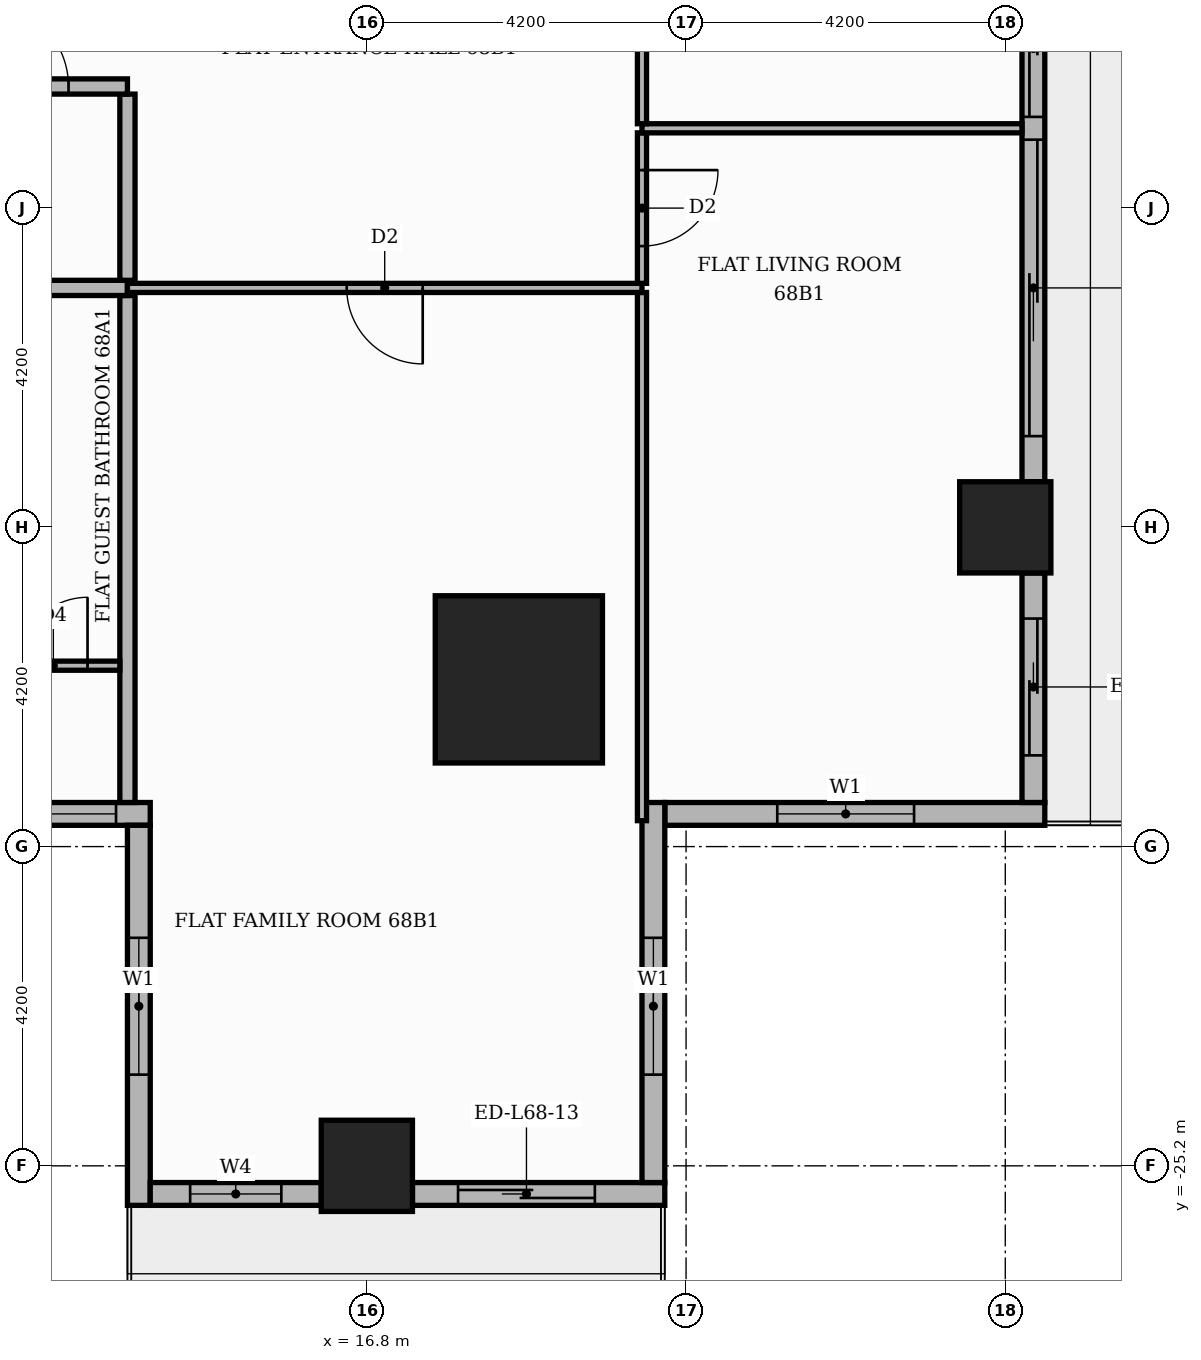
"""IFC4 building model, lengths in metres.
Left out: names, types, materials, properties, quantities, classifications, styles, units other than length and angle.
Written with IfcOpenShell. Run it as: python <this file> out.ifc"""

import sys

from ifc_helpers import new_model, si_unit, direction, frame, frame_2d, origin, origin_2d, place, context, subcontext, project, spatial, rectangle, extrude, element, fill, save


model = new_model("IFC4")
c1 = context("Model", 3, precision=1e-05, world=origin(), true_north=direction((0.0, 1.0)))
c2 = subcontext(c1, "Body", "Model", "MODEL_VIEW")
j1 = project(units=[si_unit("LENGTHUNIT", "METRE"), si_unit("PLANEANGLEUNIT", "RADIAN")], contexts=[c1])
p1 = place(None, origin())
s1 = spatial("IfcSite", under=j1, at=p1, CompositionType="ELEMENT")
p2 = place(p1, origin())
s2 = spatial("IfcBuilding", under=s1, at=p2, CompositionType="ELEMENT")
p3 = place(p2, frame((0.0, 0.0, 283.5)))
s3 = spatial("IfcBuildingStorey", under=s2, at=p3, CompositionType="ELEMENT", Elevation=283.5)
p4 = place(p3, frame((18.8, -18.8, 0.0), z_axis=(0.0, 0.0, 1.0), x_axis=(1.0, 0.0, 0.0)))
e1 = element("IfcColumn", 1, at=p4, inside=s3, PredefinedType="COLUMN", context=c2, shape_type="SweptSolid", body=[
    extrude(rectangle(XDim=2.2, YDim=2.2, at=origin_2d()), origin(), (0.0, 0.0, 1.0), 3.9),
])
for number, where, z_axis, x_axis in (
    (2, (25.2, -16.8, 0.0), (0.0, 0.0, 1.0), (1.0, 0.0, 0.0)),
    (3, (16.8, -25.2, 0.0), (0.0, 0.0, 1.0), (1.0, 0.0, 0.0)),
):
    element("IfcColumn", number, at=place(p3, frame(where, z_axis=z_axis, x_axis=x_axis)), inside=s3, PredefinedType="COLUMN", context=c2, shape_type="SweptSolid", body=[
        extrude(rectangle(XDim=1.2, YDim=1.2, at=origin_2d()), origin(), (0.0, 0.0, 1.0), 3.9),
    ])
p5 = place(p3, frame((20.72, -20.57, 0.0), z_axis=(0.0, 0.0, 1.0), x_axis=(1.0, 0.0, 0.0)))
e4 = element("IfcWall", 4, at=p5, inside=s3, PredefinedType="STANDARD", context=c2, shape_type="SweptSolid", body=[
    extrude(rectangle(XDim=5.0, YDim=0.3, at=frame_2d((2.5, 0.0))), origin(), (0.0, 0.0, 1.0), 3.4),
])
p6 = place(p5, frame((1.48, 0.0, 0.9)))
e5 = element("IfcOpeningElement", 5, at=p6, cuts=e4, PredefinedType="OPENING", context=c2, shape_type="SweptSolid", body=[
    extrude(rectangle(XDim=1.8, YDim=2.1, at=frame_2d((0.9, 1.05))), frame((0.0, 0.16, 0.0), z_axis=(0.0, -1.0, 0.0), x_axis=(1.0, 0.0, 0.0)), (0.0, 0.0, 1.0), 0.32),
])
p7 = place(p3, frame((25.57, -20.42, 0.0), z_axis=(0.0, 0.0, 1.0), x_axis=(0.0, 1.0, 0.0)))
e6 = element("IfcWall", 6, at=p7, inside=s3, PredefinedType="STANDARD", context=c2, shape_type="SweptSolid", body=[
    extrude(rectangle(XDim=3.02, YDim=0.3, at=frame_2d((1.51, 0.0))), origin(), (0.0, 0.0, 1.0), 3.4),
])
p8 = place(p7, frame((0.62, 0.0, 0.0)))
e7 = element("IfcOpeningElement", 7, at=p8, cuts=e6, PredefinedType="OPENING", context=c2, shape_type="SweptSolid", body=[
    extrude(rectangle(XDim=1.8, YDim=2.4, at=frame_2d((0.9, 1.2))), frame((0.0, 0.16, 0.0), z_axis=(0.0, -1.0, 0.0), x_axis=(1.0, 0.0, 0.0)), (0.0, 0.0, 1.0), 0.32),
])
p9 = place(p3, frame((25.57, -16.2, 0.0), z_axis=(0.0, 0.0, 1.0), x_axis=(0.0, 1.0, 0.0)))
e8 = element("IfcWall", 8, at=p9, inside=s3, PredefinedType="STANDARD", context=c2, shape_type="SweptSolid", body=[
    extrude(rectangle(XDim=7.2, YDim=0.3, at=frame_2d((3.6, 0.0))), origin(), (0.0, 0.0, 1.0), 3.4),
])
p10 = place(p9, frame((0.6, 0.0, 0.0)))
e9 = element("IfcOpeningElement", 9, at=p10, cuts=e8, PredefinedType="OPENING", context=c2, shape_type="SweptSolid", body=[
    extrude(rectangle(XDim=3.9, YDim=2.4, at=frame_2d((1.95, 1.2))), frame((0.0, 0.16, 0.0), z_axis=(0.0, -1.0, 0.0), x_axis=(1.0, 0.0, 0.0)), (0.0, 0.0, 1.0), 0.32),
])
p11 = place(p9, frame((4.8, 0.0, 0.0)))
e10 = element("IfcOpeningElement", 10, at=p11, cuts=e8, PredefinedType="OPENING", context=c2, shape_type="SweptSolid", body=[
    extrude(rectangle(XDim=1.8, YDim=2.4, at=frame_2d((0.9, 1.2))), frame((0.0, 0.16, 0.0), z_axis=(0.0, -1.0, 0.0), x_axis=(1.0, 0.0, 0.0)), (0.0, 0.0, 1.0), 0.32),
])
p12 = place(p3, frame((-13.65, -20.57, 0.0), z_axis=(0.0, 0.0, 1.0), x_axis=(1.0, 0.0, 0.0)))
e11 = element("IfcWall", 11, at=p12, inside=s3, PredefinedType="STANDARD", context=c2, shape_type="SweptSolid", body=[
    extrude(rectangle(XDim=27.6, YDim=0.3, at=frame_2d((13.8, 0.0))), origin(), (0.0, 0.0, 1.0), 3.4),
])
p13 = place(p12, frame((0.15, 0.0, 0.9)))
e12 = element("IfcOpeningElement", 12, at=p13, cuts=e11, PredefinedType="OPENING", context=c2, shape_type="SweptSolid", body=[
    extrude(rectangle(XDim=1.8, YDim=2.1, at=frame_2d((0.9, 1.05))), frame((0.0, 0.16, 0.0), z_axis=(0.0, -1.0, 0.0), x_axis=(1.0, 0.0, 0.0)), (0.0, 0.0, 1.0), 0.32),
])
p14 = place(p12, frame((2.25, 0.0, 0.9)))
e13 = element("IfcOpeningElement", 13, at=p14, cuts=e11, PredefinedType="OPENING", context=c2, shape_type="SweptSolid", body=[
    extrude(rectangle(XDim=6.0, YDim=2.1, at=frame_2d((3.0, 1.05))), frame((0.0, 0.16, 0.0), z_axis=(0.0, -1.0, 0.0), x_axis=(1.0, 0.0, 0.0)), (0.0, 0.0, 1.0), 0.32),
])
p15 = place(p12, frame((8.55, 0.0, 0.9)))
e14 = element("IfcOpeningElement", 14, at=p15, cuts=e11, PredefinedType="OPENING", context=c2, shape_type="SweptSolid", body=[
    extrude(rectangle(XDim=6.0, YDim=2.1, at=frame_2d((3.0, 1.05))), frame((0.0, 0.16, 0.0), z_axis=(0.0, -1.0, 0.0), x_axis=(1.0, 0.0, 0.0)), (0.0, 0.0, 1.0), 0.32),
])
p16 = place(p12, frame((14.85, 0.0, 0.9)))
e15 = element("IfcOpeningElement", 15, at=p16, cuts=e11, PredefinedType="OPENING", context=c2, shape_type="SweptSolid", body=[
    extrude(rectangle(XDim=6.0, YDim=2.1, at=frame_2d((3.0, 1.05))), frame((0.0, 0.16, 0.0), z_axis=(0.0, -1.0, 0.0), x_axis=(1.0, 0.0, 0.0)), (0.0, 0.0, 1.0), 0.32),
])
p17 = place(p12, frame((21.15, 0.0, 0.9)))
e16 = element("IfcOpeningElement", 16, at=p17, cuts=e11, PredefinedType="OPENING", context=c2, shape_type="SweptSolid", body=[
    extrude(rectangle(XDim=6.0, YDim=2.1, at=frame_2d((3.0, 1.05))), frame((0.0, 0.16, 0.0), z_axis=(0.0, -1.0, 0.0), x_axis=(1.0, 0.0, 0.0)), (0.0, 0.0, 1.0), 0.32),
])
p18 = place(p3, frame((13.8, -20.72, 0.0), z_axis=(0.0, 0.0, 1.0), x_axis=(0.0, -1.0, 0.0)))
e17 = element("IfcWall", 17, at=p18, inside=s3, PredefinedType="STANDARD", context=c2, shape_type="SweptSolid", body=[
    extrude(rectangle(XDim=5.0, YDim=0.3, at=frame_2d((2.5, 0.0))), origin(), (0.0, 0.0, 1.0), 3.4),
])
p19 = place(p18, frame((1.48, 0.0, 0.9)))
e18 = element("IfcOpeningElement", 18, at=p19, cuts=e17, PredefinedType="OPENING", context=c2, shape_type="SweptSolid", body=[
    extrude(rectangle(XDim=1.8, YDim=2.1, at=frame_2d((0.9, 1.05))), frame((0.0, 0.16, 0.0), z_axis=(0.0, -1.0, 0.0), x_axis=(1.0, 0.0, 0.0)), (0.0, 0.0, 1.0), 0.32),
])
p20 = place(p3, frame((13.95, -25.57, 0.0), z_axis=(0.0, 0.0, 1.0), x_axis=(1.0, 0.0, 0.0)))
e19 = element("IfcWall", 19, at=p20, inside=s3, PredefinedType="STANDARD", context=c2, shape_type="SweptSolid", body=[
    extrude(rectangle(XDim=2.25, YDim=0.3, at=frame_2d((1.125, 0.0))), origin(), (0.0, 0.0, 1.0), 3.4),
])
p21 = place(p20, frame((0.525, 0.0, 0.9)))
e20 = element("IfcOpeningElement", 20, at=p21, cuts=e19, PredefinedType="OPENING", context=c2, shape_type="SweptSolid", body=[
    extrude(rectangle(XDim=1.2, YDim=2.1, at=frame_2d((0.6, 1.05))), frame((0.0, 0.16, 0.0), z_axis=(0.0, -1.0, 0.0), x_axis=(1.0, 0.0, 0.0)), (0.0, 0.0, 1.0), 0.32),
])
p22 = place(p3, frame((17.4, -25.57, 0.0), z_axis=(0.0, 0.0, 1.0), x_axis=(1.0, 0.0, 0.0)))
e21 = element("IfcWall", 21, at=p22, inside=s3, PredefinedType="STANDARD", context=c2, shape_type="SweptSolid", body=[
    extrude(rectangle(XDim=3.32, YDim=0.3, at=frame_2d((1.66, 0.0))), origin(), (0.0, 0.0, 1.0), 3.4),
])
p23 = place(p22, frame((0.6, 0.0, 0.0)))
e22 = element("IfcOpeningElement", 22, at=p23, cuts=e21, PredefinedType="OPENING", context=c2, shape_type="SweptSolid", body=[
    extrude(rectangle(XDim=1.8, YDim=2.4, at=frame_2d((0.9, 1.2))), frame((0.0, 0.16, 0.0), z_axis=(0.0, -1.0, 0.0), x_axis=(1.0, 0.0, 0.0)), (0.0, 0.0, 1.0), 0.32),
])
p24 = place(p3, frame((20.57, -25.42, 0.0), z_axis=(0.0, 0.0, 1.0), x_axis=(0.0, 1.0, 0.0)))
e23 = element("IfcWall", 23, at=p24, inside=s3, PredefinedType="STANDARD", context=c2, shape_type="SweptSolid", body=[
    extrude(rectangle(XDim=5.0, YDim=0.3, at=frame_2d((2.5, 0.0))), origin(), (0.0, 0.0, 1.0), 3.4),
])
p25 = place(p24, frame((1.42, 0.0, 0.9)))
e24 = element("IfcOpeningElement", 24, at=p25, cuts=e23, PredefinedType="OPENING", context=c2, shape_type="SweptSolid", body=[
    extrude(rectangle(XDim=1.8, YDim=2.1, at=frame_2d((0.9, 1.05))), frame((0.0, 0.16, 0.0), z_axis=(0.0, -1.0, 0.0), x_axis=(1.0, 0.0, 0.0)), (0.0, 0.0, 1.0), 0.32),
])
p26 = place(p3, frame((13.65, -20.42, 0.0), z_axis=(0.0, 0.0, 1.0), x_axis=(0.0, 1.0, 0.0)))
e25 = element("IfcWall", 25, at=p26, inside=s3, PredefinedType="PARTITIONING", context=c2, shape_type="SweptSolid", body=[
    extrude(rectangle(XDim=6.67, YDim=0.2, at=frame_2d((3.335, 0.0))), origin(), (0.0, 0.0, 1.0), 3.4),
])
p27 = place(p3, frame((20.42, -20.659, 0.0), z_axis=(0.0, 0.0, 1.0), x_axis=(0.0, 1.0, 0.0)))
e26 = element("IfcWall", 26, at=p27, inside=s3, PredefinedType="PARTITIONING", context=c2, shape_type="SweptSolid", body=[
    extrude(rectangle(XDim=6.949, YDim=0.12, at=frame_2d((3.475, 0.0))), origin(), (0.0, 0.0, 1.0), 3.4),
])
p28 = place(p3, frame((-7.35, -18.62, 0.0), z_axis=(0.0, 0.0, 1.0), x_axis=(1.0, 0.0, 0.0)))
e27 = element("IfcWall", 27, at=p28, inside=s3, PredefinedType="PARTITIONING", context=c2, shape_type="SweptSolid", body=[
    extrude(rectangle(XDim=20.9, YDim=0.12, at=frame_2d((10.45, 0.0))), origin(), (0.0, 0.0, 1.0), 3.4),
])
p29 = place(p28, frame((2.7, 0.0, 0.0)))
e28 = element("IfcOpeningElement", 28, at=p29, cuts=e27, PredefinedType="OPENING", context=c2, shape_type="SweptSolid", body=[
    extrude(rectangle(XDim=0.9, YDim=2.1, at=frame_2d((0.45, 1.05))), frame((0.0, 0.07, 0.0), z_axis=(0.0, -1.0, 0.0), x_axis=(1.0, 0.0, 0.0)), (0.0, 0.0, 1.0), 0.14),
])
p30 = place(p28, frame((7.95, 0.0, 0.0)))
e29 = element("IfcOpeningElement", 29, at=p30, cuts=e27, PredefinedType="OPENING", context=c2, shape_type="SweptSolid", body=[
    extrude(rectangle(XDim=0.9, YDim=2.1, at=frame_2d((0.45, 1.05))), frame((0.0, 0.07, 0.0), z_axis=(0.0, -1.0, 0.0), x_axis=(1.0, 0.0, 0.0)), (0.0, 0.0, 1.0), 0.14),
])
p31 = place(p28, frame((13.35, 0.0, 0.0)))
e30 = element("IfcOpeningElement", 30, at=p31, cuts=e27, PredefinedType="OPENING", context=c2, shape_type="SweptSolid", body=[
    extrude(rectangle(XDim=0.9, YDim=2.1, at=frame_2d((0.45, 1.05))), frame((0.0, 0.07, 0.0), z_axis=(0.0, -1.0, 0.0), x_axis=(1.0, 0.0, 0.0)), (0.0, 0.0, 1.0), 0.14),
])
p32 = place(p28, frame((17.625, 0.0, 0.0)))
e31 = element("IfcOpeningElement", 31, at=p32, cuts=e27, PredefinedType="OPENING", context=c2, shape_type="SweptSolid", body=[
    extrude(rectangle(XDim=0.9, YDim=2.1, at=frame_2d((0.45, 1.05))), frame((0.0, 0.07, 0.0), z_axis=(0.0, -1.0, 0.0), x_axis=(1.0, 0.0, 0.0)), (0.0, 0.0, 1.0), 0.14),
])
p33 = place(p28, frame((19.575, 0.0, 0.0)))
e32 = element("IfcOpeningElement", 32, at=p33, cuts=e27, PredefinedType="OPENING", context=c2, shape_type="SweptSolid", body=[
    extrude(rectangle(XDim=0.9, YDim=2.1, at=frame_2d((0.45, 1.05))), frame((0.0, 0.07, 0.0), z_axis=(0.0, -1.0, 0.0), x_axis=(1.0, 0.0, 0.0)), (0.0, 0.0, 1.0), 0.14),
])
p34 = place(p3, frame((-25.42, -13.65, 0.0), z_axis=(0.0, 0.0, 1.0), x_axis=(1.0, 0.0, 0.0)))
e33 = element("IfcWall", 33, at=p34, inside=s3, PredefinedType="PARTITIONING", context=c2, shape_type="SweptSolid", body=[
    extrude(rectangle(XDim=39.07, YDim=0.2, at=frame_2d((19.535, 0.0))), origin(), (0.0, 0.0, 1.0), 3.4),
])
p35 = place(p34, frame((14.37, 0.0, 0.0)))
e34 = element("IfcOpeningElement", 34, at=p35, cuts=e33, PredefinedType="OPENING", context=c2, shape_type="SweptSolid", body=[
    extrude(rectangle(XDim=1.1, YDim=2.4, at=frame_2d((0.55, 1.2))), frame((0.0, 0.11, 0.0), z_axis=(0.0, -1.0, 0.0), x_axis=(1.0, 0.0, 0.0)), (0.0, 0.0, 1.0), 0.22),
])
p36 = place(p3, frame((13.65, -13.65, 0.0), z_axis=(0.0, 0.0, 1.0), x_axis=(1.0, 0.0, 0.0)))
e35 = element("IfcWall", 35, at=p36, inside=s3, PredefinedType="PARTITIONING", context=c2, shape_type="SweptSolid", body=[
    extrude(rectangle(XDim=6.77, YDim=0.12, at=frame_2d((3.385, 0.0))), origin(), (0.0, 0.0, 1.0), 3.4),
])
p37 = place(p36, frame((2.885, 0.0, 0.0)))
e36 = element("IfcOpeningElement", 36, at=p37, cuts=e35, PredefinedType="OPENING", context=c2, shape_type="SweptSolid", body=[
    extrude(rectangle(XDim=1.0, YDim=2.1, at=frame_2d((0.5, 1.05))), frame((0.0, 0.07, 0.0), z_axis=(0.0, -1.0, 0.0), x_axis=(1.0, 0.0, 0.0)), (0.0, 0.0, 1.0), 0.14),
])
p38 = place(p3, frame((20.42, -13.59, 0.0), z_axis=(0.0, 0.0, 1.0), x_axis=(0.0, 1.0, 0.0)))
e37 = element("IfcWall", 37, at=p38, inside=s3, PredefinedType="PARTITIONING", context=c2, shape_type="SweptSolid", body=[
    extrude(rectangle(XDim=1.98, YDim=0.12, at=frame_2d((0.99, 0.0))), origin(), (0.0, 0.0, 1.0), 3.4),
])
p39 = place(p38, frame((0.49, 0.0, 0.0)))
e38 = element("IfcOpeningElement", 38, at=p39, cuts=e37, PredefinedType="OPENING", context=c2, shape_type="SweptSolid", body=[
    extrude(rectangle(XDim=1.0, YDim=2.1, at=frame_2d((0.5, 1.05))), frame((0.0, 0.07, 0.0), z_axis=(0.0, -1.0, 0.0), x_axis=(1.0, 0.0, 0.0)), (0.0, 0.0, 1.0), 0.14),
])
p40 = place(p3, frame((13.65, -13.55, 0.0), z_axis=(0.0, 0.0, 1.0), x_axis=(0.0, 1.0, 0.0)))
e39 = element("IfcWall", 39, at=p40, inside=s3, PredefinedType="PARTITIONING", context=c2, shape_type="SweptSolid", body=[
    extrude(rectangle(XDim=2.45, YDim=0.2, at=frame_2d((1.225, 0.0))), origin(), (0.0, 0.0, 1.0), 3.4),
])
p41 = place(p3, frame((20.42, -11.55, 0.0), z_axis=(0.0, 0.0, 1.0), x_axis=(1.0, 0.0, 0.0)))
e40 = element("IfcWall", 40, at=p41, inside=s3, PredefinedType="PARTITIONING", context=c2, shape_type="SweptSolid", body=[
    extrude(rectangle(XDim=5.0, YDim=0.12, at=frame_2d((2.5, 0.0))), origin(), (0.0, 0.0, 1.0), 3.4),
])
p42 = place(p3, frame((20.42, -11.49, 0.0), z_axis=(0.0, 0.0, 1.0), x_axis=(0.0, 1.0, 0.0)))
e41 = element("IfcWall", 41, at=p42, inside=s3, PredefinedType="PARTITIONING", context=c2, shape_type="SweptSolid", body=[
    extrude(rectangle(XDim=8.28, YDim=0.12, at=frame_2d((4.14, 0.0))), origin(), (0.0, 0.0, 1.0), 3.4),
])
p43 = place(p42, frame((3.69, 0.0, 0.0)))
e42 = element("IfcOpeningElement", 42, at=p43, cuts=e41, PredefinedType="OPENING", context=c2, shape_type="SweptSolid", body=[
    extrude(rectangle(XDim=0.9, YDim=2.1, at=frame_2d((0.45, 1.05))), frame((0.0, 0.07, 0.0), z_axis=(0.0, -1.0, 0.0), x_axis=(1.0, 0.0, 0.0)), (0.0, 0.0, 1.0), 0.14),
])
p44 = place(p3, frame((11.0, -11.0, 0.0), z_axis=(0.0, 0.0, 1.0), x_axis=(1.0, 0.0, 0.0)))
e43 = element("IfcWall", 43, at=p44, inside=s3, PredefinedType="PARTITIONING", context=c2, shape_type="SweptSolid", body=[
    extrude(rectangle(XDim=2.65, YDim=0.2, at=frame_2d((1.325, 0.0))), origin(), (0.0, 0.0, 1.0), 3.4),
])
p45 = place(p44, frame((0.775, 0.0, 0.0)))
e44 = element("IfcOpeningElement", 44, at=p45, cuts=e43, PredefinedType="OPENING", context=c2, shape_type="SweptSolid", body=[
    extrude(rectangle(XDim=1.1, YDim=2.4, at=frame_2d((0.55, 1.2))), frame((0.0, 0.11, 0.0), z_axis=(0.0, -1.0, 0.0), x_axis=(1.0, 0.0, 0.0)), (0.0, 0.0, 1.0), 0.22),
])
p46 = place(p6, origin())
e45 = element("IfcWindow", 45, at=p46, inside=s3, PartitioningType="SINGLE_PANEL", PredefinedType="WINDOW", context=c2, shape_type="SweptSolid", body=[
    extrude(rectangle(XDim=1.8, YDim=2.1, at=frame_2d((0.9, 1.05))), frame((0.0, 0.03, 0.0), z_axis=(0.0, -1.0, 0.0), x_axis=(1.0, 0.0, 0.0)), (0.0, 0.0, 1.0), 0.06),
])
fill(e5, e45)
p47 = place(p8, origin())
e46 = element("IfcDoor", 46, at=p47, inside=s3, OperationType="SLIDING_TO_RIGHT", PredefinedType="DOOR", context=c2, shape_type="SweptSolid", body=[
    extrude(rectangle(XDim=1.8, YDim=2.4, at=frame_2d((0.9, 1.2))), frame((0.0, 0.025, 0.0), z_axis=(0.0, -1.0, 0.0), x_axis=(1.0, 0.0, 0.0)), (0.0, 0.0, 1.0), 0.05),
])
fill(e7, e46)
p48 = place(p10, origin())
e47 = element("IfcDoor", 47, at=p48, inside=s3, OperationType="SLIDING_TO_LEFT", PredefinedType="DOOR", context=c2, shape_type="SweptSolid", body=[
    extrude(rectangle(XDim=3.9, YDim=2.4, at=frame_2d((1.95, 1.2))), frame((0.0, 0.025, 0.0), z_axis=(0.0, -1.0, 0.0), x_axis=(1.0, 0.0, 0.0)), (0.0, 0.0, 1.0), 0.05),
])
fill(e9, e47)
p49 = place(p11, origin())
e48 = element("IfcDoor", 48, at=p49, inside=s3, OperationType="SLIDING_TO_RIGHT", PredefinedType="DOOR", context=c2, shape_type="SweptSolid", body=[
    extrude(rectangle(XDim=1.8, YDim=2.4, at=frame_2d((0.9, 1.2))), frame((0.0, 0.025, 0.0), z_axis=(0.0, -1.0, 0.0), x_axis=(1.0, 0.0, 0.0)), (0.0, 0.0, 1.0), 0.05),
])
fill(e10, e48)
p50 = place(p17, origin())
e49 = element("IfcWindow", 49, at=p50, inside=s3, PartitioningType="SINGLE_PANEL", PredefinedType="WINDOW", context=c2, shape_type="SweptSolid", body=[
    extrude(rectangle(XDim=6.0, YDim=2.1, at=frame_2d((3.0, 1.05))), frame((0.0, 0.03, 0.0), z_axis=(0.0, -1.0, 0.0), x_axis=(1.0, 0.0, 0.0)), (0.0, 0.0, 1.0), 0.06),
])
fill(e16, e49)
p51 = place(p19, origin())
e50 = element("IfcWindow", 50, at=p51, inside=s3, PartitioningType="SINGLE_PANEL", PredefinedType="WINDOW", context=c2, shape_type="SweptSolid", body=[
    extrude(rectangle(XDim=1.8, YDim=2.1, at=frame_2d((0.9, 1.05))), frame((0.0, 0.03, 0.0), z_axis=(0.0, -1.0, 0.0), x_axis=(1.0, 0.0, 0.0)), (0.0, 0.0, 1.0), 0.06),
])
fill(e18, e50)
p52 = place(p21, origin())
e51 = element("IfcWindow", 51, at=p52, inside=s3, PartitioningType="SINGLE_PANEL", PredefinedType="WINDOW", context=c2, shape_type="SweptSolid", body=[
    extrude(rectangle(XDim=1.2, YDim=2.1, at=frame_2d((0.6, 1.05))), frame((0.0, 0.03, 0.0), z_axis=(0.0, -1.0, 0.0), x_axis=(1.0, 0.0, 0.0)), (0.0, 0.0, 1.0), 0.06),
])
fill(e20, e51)
p53 = place(p23, origin())
e52 = element("IfcDoor", 52, at=p53, inside=s3, OperationType="SLIDING_TO_LEFT", PredefinedType="DOOR", context=c2, shape_type="SweptSolid", body=[
    extrude(rectangle(XDim=1.8, YDim=2.4, at=frame_2d((0.9, 1.2))), frame((0.0, 0.025, 0.0), z_axis=(0.0, -1.0, 0.0), x_axis=(1.0, 0.0, 0.0)), (0.0, 0.0, 1.0), 0.05),
])
fill(e22, e52)
p54 = place(p25, origin())
e53 = element("IfcWindow", 53, at=p54, inside=s3, PartitioningType="SINGLE_PANEL", PredefinedType="WINDOW", context=c2, shape_type="SweptSolid", body=[
    extrude(rectangle(XDim=1.8, YDim=2.1, at=frame_2d((0.9, 1.05))), frame((0.0, 0.03, 0.0), z_axis=(0.0, -1.0, 0.0), x_axis=(1.0, 0.0, 0.0)), (0.0, 0.0, 1.0), 0.06),
])
fill(e24, e53)
p55 = place(p33, origin())
e54 = element("IfcDoor", 54, at=p55, inside=s3, OperationType="SINGLE_SWING_RIGHT", PredefinedType="DOOR", context=c2, shape_type="SweptSolid", body=[
    extrude(rectangle(XDim=0.9, YDim=2.1, at=frame_2d((0.45, 1.05))), frame((0.0, 0.025, 0.0), z_axis=(0.0, -1.0, 0.0), x_axis=(1.0, 0.0, 0.0)), (0.0, 0.0, 1.0), 0.05),
])
fill(e32, e54)
p56 = place(p45, origin())
e55 = element("IfcDoor", 55, at=p56, inside=s3, OperationType="SINGLE_SWING_LEFT", PredefinedType="DOOR", context=c2, shape_type="SweptSolid", body=[
    extrude(rectangle(XDim=1.1, YDim=2.4, at=frame_2d((0.55, 1.2))), frame((0.0, 0.025, 0.0), z_axis=(0.0, -1.0, 0.0), x_axis=(1.0, 0.0, 0.0)), (0.0, 0.0, 1.0), 0.05),
])
fill(e44, e55)
p57 = place(p37, frame((1.0, 0.0, 0.0), z_axis=(0.0, 0.0, 1.0), x_axis=(-1.0, 0.0, 0.0)))
e56 = element("IfcDoor", 56, at=p57, inside=s3, OperationType="SINGLE_SWING_RIGHT", PredefinedType="DOOR", context=c2, shape_type="SweptSolid", body=[
    extrude(rectangle(XDim=1.0, YDim=2.1, at=frame_2d((0.5, 1.05))), frame((0.0, 0.025, 0.0), z_axis=(0.0, -1.0, 0.0), x_axis=(1.0, 0.0, 0.0)), (0.0, 0.0, 1.0), 0.05),
])
fill(e36, e56)
p58 = place(p39, frame((1.0, 0.0, 0.0), z_axis=(0.0, 0.0, 1.0), x_axis=(-1.0, 0.0, 0.0)))
e57 = element("IfcDoor", 57, at=p58, inside=s3, OperationType="SINGLE_SWING_RIGHT", PredefinedType="DOOR", context=c2, shape_type="SweptSolid", body=[
    extrude(rectangle(XDim=1.0, YDim=2.1, at=frame_2d((0.5, 1.05))), frame((0.0, 0.025, 0.0), z_axis=(0.0, -1.0, 0.0), x_axis=(1.0, 0.0, 0.0)), (0.0, 0.0, 1.0), 0.05),
])
fill(e38, e57)
save(model, sys.argv[1])
